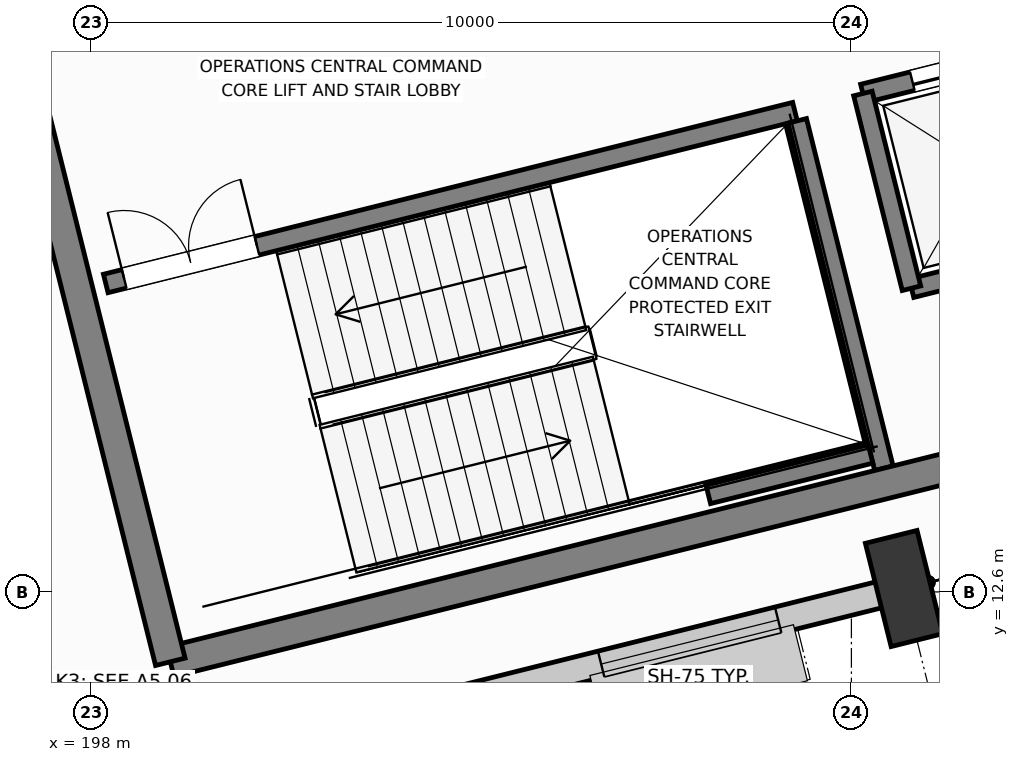
"""IFC4 building model, lengths in metres.
Left out: names, types, materials, properties, quantities, classifications, styles, units other than length and angle.
Written with IfcOpenShell. Run it as: python <this file> out.ifc"""

import sys

from ifc_helpers import new_model, si_unit, direction, frame, frame_2d, origin, origin_2d, place, context, subcontext, project, spatial, rectangle, extrude, element, fill, save


model = new_model("IFC4")
c1 = context("Model", 3, precision=1e-05, world=origin(), true_north=direction((0.0, 1.0)))
c2 = subcontext(c1, "Body", "Model", "MODEL_VIEW")
j1 = project(units=[si_unit("LENGTHUNIT", "METRE"), si_unit("PLANEANGLEUNIT", "RADIAN")], contexts=[c1])
p1 = place(None, origin())
s1 = spatial("IfcSite", under=j1, at=p1, CompositionType="ELEMENT")
p2 = place(p1, origin())
s2 = spatial("IfcBuilding", under=s1, at=p2, CompositionType="ELEMENT")
p3 = place(p2, frame((0.0, 0.0, 11.4)))
s3 = spatial("IfcBuildingStorey", under=s2, at=p3, CompositionType="ELEMENT", Elevation=11.4)
p4 = place(p3, frame((208.693, 12.645, 0.0), z_axis=(0.0, 0.0, 1.0), x_axis=(0.970295726276, 0.2419218956, 0.0)))
e1 = element("IfcColumn", 1, at=p4, inside=s3, PredefinedType="COLUMN", context=c2, shape_type="SweptSolid", body=[
    extrude(rectangle(XDim=0.7, YDim=1.4, at=origin_2d()), origin(), (0.0, 0.0, 1.0), 4.8),
])
p5 = place(p3, frame((198.326, 10.06, 0.0), z_axis=(0.0, 0.0, 1.0), x_axis=(0.970293766674, 0.241929755, 0.0)))
e2 = element("IfcWall", 2, at=p5, inside=s3, PredefinedType="STANDARD", context=c2, shape_type="SweptSolid", body=[
    extrude(rectangle(XDim=10.37, YDim=0.35, at=frame_2d((5.185, 0.0))), origin(), (0.0, 0.0, 1.0), 3.175),
])
p6 = place(p5, frame((1.393, 0.0, 0.85)))
e3 = element("IfcOpeningElement", 3, at=p6, cuts=e2, PredefinedType="OPENING", context=c2, shape_type="SweptSolid", body=[
    extrude(rectangle(XDim=2.4, YDim=1.8, at=frame_2d((1.2, 0.9))), frame((0.0, 0.185, 0.0), z_axis=(0.0, -1.0, 0.0), x_axis=(1.0, 0.0, 0.0)), (0.0, 0.0, 1.0), 0.37),
])
p7 = place(p5, frame((6.577, 0.0, 0.85)))
e4 = element("IfcOpeningElement", 4, at=p7, cuts=e2, PredefinedType="OPENING", context=c2, shape_type="SweptSolid", body=[
    extrude(rectangle(XDim=2.4, YDim=1.8, at=frame_2d((1.2, 0.9))), frame((0.0, 0.185, 0.0), z_axis=(0.0, -1.0, 0.0), x_axis=(1.0, 0.0, 0.0)), (0.0, 0.0, 1.0), 0.37),
])
p8 = place(p3, frame((208.79, 16.595, 0.0), z_axis=(0.0, 0.0, 1.0), x_axis=(0.97029284861, 0.241933436994, 0.0)))
e5 = element("IfcWall", 5, at=p8, inside=s3, PredefinedType="SOLIDWALL", context=c2, shape_type="SweptSolid", body=[
    extrude(rectangle(XDim=2.54, YDim=0.25, at=frame_2d((1.27, 0.0))), origin(), (0.0, 0.0, 1.0), 4.46),
])
p9 = place(p3, frame((210.616, 19.771, 0.0), z_axis=(0.0, 0.0, 1.0), x_axis=(-0.97029284861, -0.241933436994, 0.0)))
e6 = element("IfcWall", 6, at=p9, inside=s3, PredefinedType="SOLIDWALL", context=c2, shape_type="SweptSolid", body=[
    extrude(rectangle(XDim=2.54, YDim=0.25, at=frame_2d((1.27, 0.0))), origin(), (0.0, 0.0, 1.0), 4.46),
])
p10 = place(p9, frame((0.67, 0.0, 0.0)))
e7 = element("IfcOpeningElement", 7, at=p10, cuts=e6, PredefinedType="OPENING", context=c2, shape_type="SweptSolid", body=[
    extrude(rectangle(XDim=1.2, YDim=2.2, at=frame_2d((0.6, 1.1))), frame((0.0, 0.135, 0.0), z_axis=(0.0, -1.0, 0.0), x_axis=(1.0, 0.0, 0.0)), (0.0, 0.0, 1.0), 0.27),
])
p11 = place(p3, frame((208.151, 19.157, 0.0), z_axis=(0.0, 0.0, 1.0), x_axis=(0.241938414856, -0.970291607413, 0.0)))
e8 = element("IfcWall", 8, at=p11, inside=s3, PredefinedType="SOLIDWALL", context=c2, shape_type="SweptSolid", body=[
    extrude(rectangle(XDim=2.64, YDim=0.25, at=frame_2d((1.32, 0.0))), origin(), (0.0, 0.0, 1.0), 4.46),
])
p12 = place(p3, frame((198.19, 16.658, 0.0), z_axis=(0.0, 0.0, 1.0), x_axis=(0.970297151331, 0.241916179943, 0.0)))
e9 = element("IfcWall", 9, at=p12, inside=s3, PredefinedType="SOLIDWALL", context=c2, shape_type="SweptSolid", body=[
    extrude(rectangle(XDim=9.345, YDim=0.25, at=frame_2d((4.673, 0.0))), origin(), (0.0, 0.0, 1.0), 4.43),
])
p13 = place(p12, frame((0.25, 0.0, 0.0)))
e10 = element("IfcOpeningElement", 10, at=p13, cuts=e9, PredefinedType="OPENING", context=c2, shape_type="SweptSolid", body=[
    extrude(rectangle(XDim=1.8, YDim=2.25, at=frame_2d((0.9, 1.125))), frame((0.0, 0.135, 0.0), z_axis=(0.0, -1.0, 0.0), x_axis=(1.0, 0.0, 0.0)), (0.0, 0.0, 1.0), 0.27),
])
p14 = place(p3, frame((208.427, 14.227, 0.0), z_axis=(0.0, 0.0, 1.0), x_axis=(-0.241911120435, 0.970298412763, 0.0)))
e11 = element("IfcWall", 11, at=p14, inside=s3, PredefinedType="SOLIDWALL", context=c2, shape_type="SweptSolid", body=[
    extrude(rectangle(XDim=4.71, YDim=0.25, at=frame_2d((2.355, 0.0))), origin(), (0.0, 0.0, 1.0), 4.43),
])
p15 = place(p3, frame((206.117, 13.883, 0.0), z_axis=(0.0, 0.0, 1.0), x_axis=(0.97029738597, 0.241915238833, 0.0)))
e12 = element("IfcWall", 12, at=p15, inside=s3, PredefinedType="SOLIDWALL", context=c2, shape_type="SweptSolid", body=[
    extrude(rectangle(XDim=2.2, YDim=0.25, at=frame_2d((1.1, 0.0))), origin(), (0.0, 0.0, 1.0), 4.43),
])
p16 = place(p3, frame((199.04, 11.681, 0.0), z_axis=(0.0, 0.0, 1.0), x_axis=(0.970295578967, 0.241922486422, 0.0)))
e13 = element("IfcWall", 13, at=p16, inside=s3, PredefinedType="SHEAR", context=c2, shape_type="SweptSolid", body=[
    extrude(rectangle(XDim=14.2, YDim=0.4, at=frame_2d((7.1, 0.0))), origin(), (0.0, 0.0, 1.0), 4.46),
])
p17 = place(p3, frame((196.862, 20.413, 0.0), z_axis=(0.0, 0.0, 1.0), x_axis=(0.241921199913, -0.97029589973, 0.0)))
e14 = element("IfcWall", 14, at=p17, inside=s3, PredefinedType="SHEAR", context=c2, shape_type="SweptSolid", body=[
    extrude(rectangle(XDim=9.0, YDim=0.4, at=frame_2d((4.5, 0.0))), origin(), (0.0, 0.0, 1.0), 4.46),
])
p18 = place(p3, frame((202.6, 27.409, 0.0), z_axis=(0.0, 0.0, 1.0), x_axis=(-0.970295311026, -0.241923561072, 0.0)))
e15 = element("IfcWall", 15, at=p18, inside=s3, PredefinedType="PARTITIONING", context=c2, shape_type="SweptSolid", body=[
    extrude(rectangle(XDim=41.06, YDim=0.2, at=frame_2d((20.53, 0.0))), origin(), (0.0, 0.0, 1.0), 3.225),
])
p19 = place(p18, frame((19.98, 0.0, 0.0)))
e16 = element("IfcOpeningElement", 16, at=p19, cuts=e15, PredefinedType="OPENING", context=c2, shape_type="SweptSolid", body=[
    extrude(rectangle(XDim=1.1, YDim=2.2, at=frame_2d((0.55, 1.1))), frame((0.0, 0.11, 0.0), z_axis=(0.0, -1.0, 0.0), x_axis=(1.0, 0.0, 0.0)), (0.0, 0.0, 1.0), 0.22),
])
p20 = place(p7, origin())
e17 = element("IfcWindow", 17, at=p20, inside=s3, PartitioningType="SINGLE_PANEL", PredefinedType="WINDOW", context=c2, shape_type="SweptSolid", body=[
    extrude(rectangle(XDim=2.4, YDim=1.8, at=frame_2d((1.2, 0.9))), frame((0.0, 0.03, 0.0), z_axis=(0.0, -1.0, 0.0), x_axis=(1.0, 0.0, 0.0)), (0.0, 0.0, 1.0), 0.06),
])
fill(e4, e17)
p21 = place(p10, origin())
e18 = element("IfcDoor", 18, at=p21, inside=s3, OperationType="SLIDING_TO_LEFT", PredefinedType="DOOR", context=c2, shape_type="SweptSolid", body=[
    extrude(rectangle(XDim=1.2, YDim=2.2, at=frame_2d((0.6, 1.1))), frame((0.0, 0.025, 0.0), z_axis=(0.0, -1.0, 0.0), x_axis=(1.0, 0.0, 0.0)), (0.0, 0.0, 1.0), 0.05),
])
fill(e7, e18)
p22 = place(p13, origin())
e19 = element("IfcDoor", 19, at=p22, inside=s3, OperationType="DOUBLE_DOOR_SINGLE_SWING", PredefinedType="DOOR", context=c2, shape_type="SweptSolid", body=[
    extrude(rectangle(XDim=1.8, YDim=2.25, at=frame_2d((0.9, 1.125))), frame((0.0, 0.025, 0.0), z_axis=(0.0, -1.0, 0.0), x_axis=(1.0, 0.0, 0.0)), (0.0, 0.0, 1.0), 0.05),
])
fill(e10, e19)
save(model, sys.argv[1])
